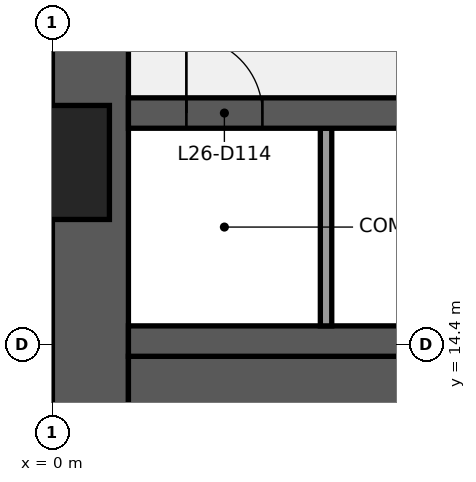
"""IFC4 building model, lengths in metres.
Left out: names, types, materials, properties, quantities, classifications, styles, units other than length and angle.
Written with IfcOpenShell. Run it as: python <this file> out.ifc"""

import sys

from ifc_helpers import new_model, si_unit, direction, frame, frame_2d, origin, place, context, subcontext, project, spatial, rectangle, extrude, element, fill, save


model = new_model("IFC4")
c1 = context("Model", 3, precision=1e-05, world=origin(), true_north=direction((0.0, 1.0)))
c2 = subcontext(c1, "Body", "Model", "MODEL_VIEW")
j1 = project(units=[si_unit("LENGTHUNIT", "METRE"), si_unit("PLANEANGLEUNIT", "RADIAN")], contexts=[c1])
p1 = place(None, origin())
s1 = spatial("IfcSite", under=j1, at=p1, CompositionType="ELEMENT")
p2 = place(p1, origin())
s2 = spatial("IfcBuilding", under=s1, at=p2, CompositionType="ELEMENT")
p3 = place(p2, frame((0.0, 0.0, 124.1)))
s3 = spatial("IfcBuildingStorey", under=s2, at=p3, CompositionType="ELEMENT", Elevation=124.1)
p4 = place(p3, frame((0.5, 9.6, 0.0), z_axis=(0.0, 0.0, 1.0), x_axis=(0.0, 1.0, 0.0)))
e1 = element("IfcWall", 1, at=p4, inside=s3, PredefinedType="SHEAR", context=c2, shape_type="SweptSolid", body=[
    extrude(rectangle(XDim=28.8, YDim=1.0, at=frame_2d((14.4, 0.0))), origin(), (0.0, 0.0, 1.0), 3.84),
])
p5 = place(p4, frame((8.85, 0.0, 0.9)))
e2 = element("IfcOpeningElement", 2, at=p5, cuts=e1, PredefinedType="OPENING", context=c2, shape_type="SweptSolid", body=[
    extrude(rectangle(XDim=1.5, YDim=1.5, at=frame_2d((0.75, 0.75))), frame((0.0, 0.51, 0.0), z_axis=(0.0, -1.0, 0.0), x_axis=(1.0, 0.0, 0.0)), (0.0, 0.0, 1.0), 1.02),
])
p6 = place(p4, frame((18.45, 0.0, 0.9)))
e3 = element("IfcOpeningElement", 3, at=p6, cuts=e1, PredefinedType="OPENING", context=c2, shape_type="SweptSolid", body=[
    extrude(rectangle(XDim=1.5, YDim=1.5, at=frame_2d((0.75, 0.75))), frame((0.0, 0.51, 0.0), z_axis=(0.0, -1.0, 0.0), x_axis=(1.0, 0.0, 0.0)), (0.0, 0.0, 1.0), 1.02),
])
p7 = place(p3, frame((1.0, 12.425, 0.0), z_axis=(0.0, 0.0, 1.0), x_axis=(1.0, 0.0, 0.0)))
e4 = element("IfcWall", 4, at=p7, inside=s3, PredefinedType="SHEAR", context=c2, shape_type="SweptSolid", body=[
    extrude(rectangle(XDim=5.25, YDim=3.65, at=frame_2d((2.625, 0.0))), origin(), (0.0, 0.0, 1.0), 3.84),
])
p8 = place(p3, frame((1.0, 14.45, 0.0), z_axis=(0.0, 0.0, 1.0), x_axis=(1.0, 0.0, 0.0)))
e5 = element("IfcWall", 5, at=p8, inside=s3, PredefinedType="SHEAR", context=c2, shape_type="SweptSolid", body=[
    extrude(rectangle(XDim=17.2, YDim=0.4, at=frame_2d((8.6, 0.0))), origin(), (0.0, 0.0, 1.0), 3.84),
])
p9 = place(p3, frame((3.6, 14.65, 0.0), z_axis=(0.0, 0.0, 1.0), x_axis=(0.0, 1.0, 0.0)))
e6 = element("IfcWall", 6, at=p9, inside=s3, PredefinedType="PARTITIONING", context=c2, shape_type="SweptSolid", body=[
    extrude(rectangle(XDim=2.6, YDim=0.15, at=frame_2d((1.3, 0.0))), origin(), (0.0, 0.0, 1.0), 3.84),
])
p10 = place(p3, frame((1.0, 17.45, 0.0), z_axis=(0.0, 0.0, 1.0), x_axis=(1.0, 0.0, 0.0)))
e7 = element("IfcWall", 7, at=p10, inside=s3, PredefinedType="SHEAR", context=c2, shape_type="SweptSolid", body=[
    extrude(rectangle(XDim=17.2, YDim=0.4, at=frame_2d((8.6, 0.0))), origin(), (0.0, 0.0, 1.0), 3.84),
])
p11 = place(p10, frame((0.762, 0.0, 0.0)))
e8 = element("IfcOpeningElement", 8, at=p11, cuts=e7, PredefinedType="OPENING", context=c2, shape_type="SweptSolid", body=[
    extrude(rectangle(XDim=1.0, YDim=2.1, at=frame_2d((0.5, 1.05))), frame((0.0, 0.21, 0.0), z_axis=(0.0, -1.0, 0.0), x_axis=(1.0, 0.0, 0.0)), (0.0, 0.0, 1.0), 0.42),
])
p12 = place(p10, frame((4.5, 0.0, 0.0)))
e9 = element("IfcOpeningElement", 9, at=p12, cuts=e7, PredefinedType="OPENING", context=c2, shape_type="SweptSolid", body=[
    extrude(rectangle(XDim=1.0, YDim=2.1, at=frame_2d((0.5, 1.05))), frame((0.0, 0.21, 0.0), z_axis=(0.0, -1.0, 0.0), x_axis=(1.0, 0.0, 0.0)), (0.0, 0.0, 1.0), 0.42),
])
p13 = place(p10, frame((8.4, 0.0, 0.0)))
e10 = element("IfcOpeningElement", 10, at=p13, cuts=e7, PredefinedType="OPENING", context=c2, shape_type="SweptSolid", body=[
    extrude(rectangle(XDim=1.0, YDim=2.1, at=frame_2d((0.5, 1.05))), frame((0.0, 0.21, 0.0), z_axis=(0.0, -1.0, 0.0), x_axis=(1.0, 0.0, 0.0)), (0.0, 0.0, 1.0), 0.42),
])
p14 = place(p10, frame((11.4, 0.0, 0.0)))
e11 = element("IfcOpeningElement", 11, at=p14, cuts=e7, PredefinedType="OPENING", context=c2, shape_type="SweptSolid", body=[
    extrude(rectangle(XDim=1.0, YDim=2.1, at=frame_2d((0.5, 1.05))), frame((0.0, 0.21, 0.0), z_axis=(0.0, -1.0, 0.0), x_axis=(1.0, 0.0, 0.0)), (0.0, 0.0, 1.0), 0.42),
])
p15 = place(p10, frame((14.837, 0.0, 0.0)))
e12 = element("IfcOpeningElement", 12, at=p15, cuts=e7, PredefinedType="OPENING", context=c2, shape_type="SweptSolid", body=[
    extrude(rectangle(XDim=1.0, YDim=2.1, at=frame_2d((0.5, 1.05))), frame((0.0, 0.21, 0.0), z_axis=(0.0, -1.0, 0.0), x_axis=(1.0, 0.0, 0.0)), (0.0, 0.0, 1.0), 0.42),
])
p16 = place(p11, origin())
e13 = element("IfcDoor", 13, at=p16, inside=s3, OperationType="SINGLE_SWING_LEFT", PredefinedType="DOOR", context=c2, shape_type="SweptSolid", body=[
    extrude(rectangle(XDim=1.0, YDim=2.1, at=frame_2d((0.5, 1.05))), frame((0.0, 0.025, 0.0), z_axis=(0.0, -1.0, 0.0), x_axis=(1.0, 0.0, 0.0)), (0.0, 0.0, 1.0), 0.05),
])
fill(e8, e13)
save(model, sys.argv[1])
